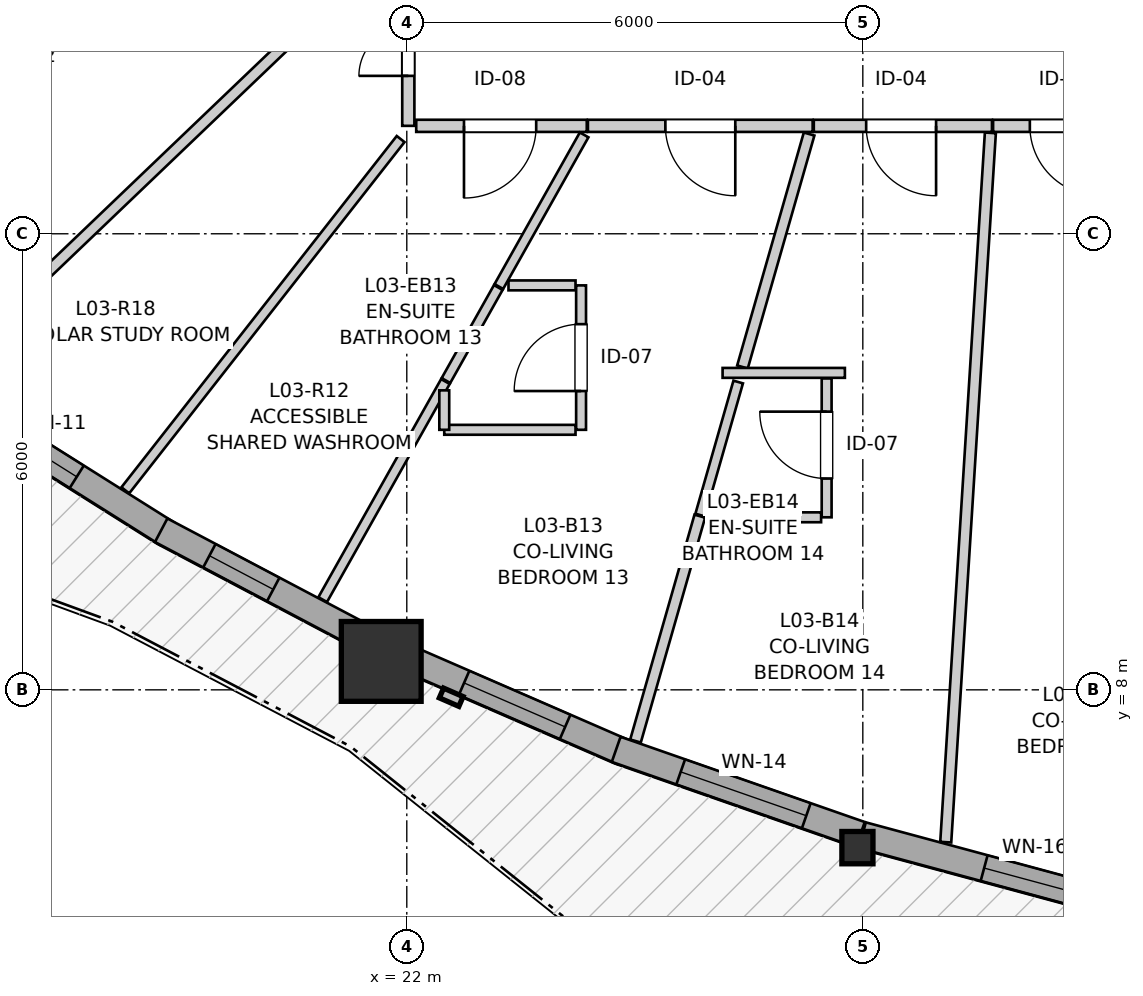
"""IFC4 building model, lengths in metres.
Left out: names, types, materials, properties, quantities, classifications, styles, units other than length and angle.
Written with IfcOpenShell. Run it as: python <this file> out.ifc"""

import sys

from ifc_helpers import new_model, si_unit, direction, frame, frame_2d, origin, origin_2d, place, context, subcontext, project, spatial, rectangle, i_section, extrude, source, transform, mapped, element, fill, save


model = new_model("IFC4")
c1 = context("Model", 3, precision=1e-05, world=origin(), true_north=direction((0.0, 1.0)))
c2 = subcontext(c1, "Body", "Model", "MODEL_VIEW")
j1 = project(units=[si_unit("LENGTHUNIT", "METRE"), si_unit("PLANEANGLEUNIT", "RADIAN")], contexts=[c1])
p1 = place(None, origin())
s1 = spatial("IfcSite", under=j1, at=p1, CompositionType="ELEMENT")
p2 = place(p1, origin())
s2 = spatial("IfcBuilding", under=s1, at=p2, CompositionType="ELEMENT")
p3 = place(p2, frame((0.0, 0.0, 14.2)))
s3 = spatial("IfcBuildingStorey", under=s2, at=p3, CompositionType="ELEMENT", Elevation=14.2)
m1 = source(origin(), c2, "Body", "SweptSolid", [
    extrude(rectangle(XDim=1.05, YDim=1.05, at=origin_2d()), origin(), (0.0, 0.0, 1.0), 2.94),
])
p4 = place(p3, frame((21.664, 8.374, 0.0), z_axis=(0.0, 0.0, 1.0), x_axis=(1.0, 0.0, 0.0)))
e1 = element("IfcColumn", 1, at=p4, inside=s3, PredefinedType="COLUMN", context=c2, shape_type="MappedRepresentation", body=[
    mapped(m1, transform((0.0, 0.0, 0.0), x_axis=(1.0, 0.0, 0.0), y_axis=(0.0, 1.0, 0.0), z_axis=(0.0, 0.0, 1.0), scale=1.0)),
])
m2 = source(origin(), c2, "Body", "SweptSolid", [
    extrude(i_section(OverallWidth=0.409, OverallDepth=0.425, WebThickness=0.03, FlangeThickness=0.048, FilletRadius=0.015, at=origin_2d()), origin(), (0.0, 0.0, 1.0), 2.94),
])
p5 = place(p3, frame((27.929, 5.924, 0.0), z_axis=(0.0, 0.0, 1.0), x_axis=(1.0, 0.0, 0.0)))
e2 = element("IfcColumn", 2, at=p5, inside=s3, PredefinedType="PILASTER", context=c2, shape_type="MappedRepresentation", body=[
    mapped(m2, transform((0.0, 0.0, 0.0), x_axis=(1.0, 0.0, 0.0), y_axis=(0.0, 1.0, 0.0), z_axis=(0.0, 0.0, 1.0), scale=1.0)),
])
p6 = place(p3, frame((16.014, 11.837, 0.0), z_axis=(0.0, 0.0, 1.0), x_axis=(0.846420438233, -0.532515203295, 0.0)))
e3 = element("IfcWall", 3, at=p6, inside=s3, PredefinedType="SOLIDWALL", context=c2, shape_type="SweptSolid", body=[
    extrude(rectangle(XDim=3.346, YDim=0.35, at=frame_2d((1.673, 0.0))), origin(), (0.0, 0.0, 1.0), 2.42),
])
p7 = place(p6, frame((0.692, 0.0, 0.82)))
e4 = element("IfcOpeningElement", 4, at=p7, cuts=e3, PredefinedType="OPENING", context=c2, shape_type="SweptSolid", body=[
    extrude(rectangle(XDim=1.25, YDim=1.35, at=frame_2d((0.625, 0.675))), frame((0.0, 0.185, 0.0), z_axis=(0.0, -1.0, 0.0), x_axis=(1.0, 0.0, 0.0)), (0.0, 0.0, 1.0), 0.37),
])
p8 = place(p3, frame((18.769, 10.1, 0.0), z_axis=(0.0, 0.0, 1.0), x_axis=(0.884401188265, -0.466727477438, 0.0)))
e5 = element("IfcWall", 5, at=p8, inside=s3, PredefinedType="SOLIDWALL", context=c2, shape_type="SweptSolid", body=[
    extrude(rectangle(XDim=3.066, YDim=0.35, at=frame_2d((1.533, 0.0))), origin(), (0.0, 0.0, 1.0), 2.42),
])
p9 = place(p8, frame((0.717, 0.0, 0.82)))
e6 = element("IfcOpeningElement", 6, at=p9, cuts=e5, PredefinedType="OPENING", context=c2, shape_type="SweptSolid", body=[
    extrude(rectangle(XDim=0.95, YDim=1.35, at=frame_2d((0.475, 0.675))), frame((0.0, 0.185, 0.0), z_axis=(0.0, -1.0, 0.0), x_axis=(1.0, 0.0, 0.0)), (0.0, 0.0, 1.0), 0.37),
])
p10 = place(p3, frame((22.009, 8.415, 0.0), z_axis=(0.0, 0.0, 1.0), x_axis=(0.917077605242, -0.398708748292, 0.0)))
e7 = element("IfcWall", 7, at=p10, inside=s3, PredefinedType="SOLIDWALL", context=c2, shape_type="SweptSolid", body=[
    extrude(rectangle(XDim=3.085, YDim=0.35, at=frame_2d((1.542, 0.0))), origin(), (0.0, 0.0, 1.0), 2.42),
])
p11 = place(p10, frame((0.812, 0.0, 0.82)))
e8 = element("IfcOpeningElement", 8, at=p11, cuts=e7, PredefinedType="OPENING", context=c2, shape_type="SweptSolid", body=[
    extrude(rectangle(XDim=1.45, YDim=1.25, at=frame_2d((0.725, 0.625))), frame((0.0, 0.185, 0.0), z_axis=(0.0, -1.0, 0.0), x_axis=(1.0, 0.0, 0.0)), (0.0, 0.0, 1.0), 0.37),
])
p12 = place(p3, frame((24.755, 7.217, 0.0), z_axis=(0.0, 0.0, 1.0), x_axis=(0.944148800827, -0.329519410501, 0.0)))
e9 = element("IfcWall", 9, at=p12, inside=s3, PredefinedType="SOLIDWALL", context=c2, shape_type="SweptSolid", body=[
    extrude(rectangle(XDim=3.403, YDim=0.35, at=frame_2d((1.701, 0.0))), origin(), (0.0, 0.0, 1.0), 2.42),
])
p13 = place(p12, frame((0.899, 0.0, 0.82)))
e10 = element("IfcOpeningElement", 10, at=p13, cuts=e9, PredefinedType="OPENING", context=c2, shape_type="SweptSolid", body=[
    extrude(rectangle(XDim=1.75, YDim=1.3, at=frame_2d((0.875, 0.65))), frame((0.0, 0.185, 0.0), z_axis=(0.0, -1.0, 0.0), x_axis=(1.0, 0.0, 0.0)), (0.0, 0.0, 1.0), 0.37),
])
p14 = place(p3, frame((27.994, 6.088, 0.0), z_axis=(0.0, 0.0, 1.0), x_axis=(0.965452701472, -0.260578359079, 0.0)))
e11 = element("IfcWall", 11, at=p14, inside=s3, PredefinedType="SOLIDWALL", context=c2, shape_type="SweptSolid", body=[
    extrude(rectangle(XDim=3.459, YDim=0.35, at=frame_2d((1.729, 0.0))), origin(), (0.0, 0.0, 1.0), 2.42),
])
p15 = place(p14, frame((1.66, 0.0, 0.82)))
e12 = element("IfcOpeningElement", 12, at=p15, cuts=e11, PredefinedType="OPENING", context=c2, shape_type="SweptSolid", body=[
    extrude(rectangle(XDim=1.15, YDim=1.2, at=frame_2d((0.575, 0.6))), frame((0.0, 0.185, 0.0), z_axis=(0.0, -1.0, 0.0), x_axis=(1.0, 0.0, 0.0)), (0.0, 0.0, 1.0), 0.37),
])
p16 = place(p3, frame((27.34, 15.42, 0.0), z_axis=(0.0, 0.0, 1.0), x_axis=(-1.0, 0.0, 0.0)))
e13 = element("IfcWall", 13, at=p16, inside=s3, PredefinedType="PARTITIONING", context=c2, shape_type="SweptSolid", body=[
    extrude(rectangle(XDim=2.957, YDim=0.16, at=frame_2d((1.479, 0.0))), origin(), (0.0, 0.0, 1.0), 2.94),
])
p17 = place(p16, frame((1.018, 0.0, 0.0)))
e14 = element("IfcOpeningElement", 14, at=p17, cuts=e13, PredefinedType="OPENING", context=c2, shape_type="SweptSolid", body=[
    extrude(rectangle(XDim=0.92, YDim=2.1, at=frame_2d((0.46, 1.05))), frame((0.0, 0.09, 0.0), z_axis=(0.0, -1.0, 0.0), x_axis=(1.0, 0.0, 0.0)), (0.0, 0.0, 1.0), 0.18),
])
p18 = place(p3, frame((22.02, 15.42, 0.0), z_axis=(0.0, 0.0, 1.0), x_axis=(0.0, 1.0, 0.0)))
e15 = element("IfcWall", 15, at=p18, inside=s3, PredefinedType="PARTITIONING", context=c2, shape_type="SweptSolid", body=[
    extrude(rectangle(XDim=2.579, YDim=0.16, at=frame_2d((1.29, 0.0))), origin(), (0.0, 0.0, 1.0), 2.94),
])
p19 = place(p18, frame((0.657, 0.0, 0.0)))
e16 = element("IfcOpeningElement", 16, at=p19, cuts=e15, PredefinedType="OPENING", context=c2, shape_type="SweptSolid", body=[
    extrude(rectangle(XDim=1.3, YDim=2.1, at=frame_2d((0.65, 1.05))), frame((0.0, 0.09, 0.0), z_axis=(0.0, -1.0, 0.0), x_axis=(1.0, 0.0, 0.0)), (0.0, 0.0, 1.0), 0.18),
])
p20 = place(p3, frame((29.699, 15.42, 0.0), z_axis=(0.0, 0.0, 1.0), x_axis=(-1.0, 0.0, 0.0)))
e17 = element("IfcWall", 17, at=p20, inside=s3, PredefinedType="PARTITIONING", context=c2, shape_type="SweptSolid", body=[
    extrude(rectangle(XDim=2.344, YDim=0.16, at=frame_2d((1.172, 0.0))), origin(), (0.0, 0.0, 1.0), 2.94),
])
p21 = place(p20, frame((0.735, 0.0, 0.0)))
e18 = element("IfcOpeningElement", 18, at=p21, cuts=e17, PredefinedType="OPENING", context=c2, shape_type="SweptSolid", body=[
    extrude(rectangle(XDim=0.92, YDim=2.1, at=frame_2d((0.46, 1.05))), frame((0.0, 0.09, 0.0), z_axis=(0.0, -1.0, 0.0), x_axis=(1.0, 0.0, 0.0)), (0.0, 0.0, 1.0), 0.18),
])
p22 = place(p3, frame((24.368, 15.42, 0.0), z_axis=(0.0, 0.0, 1.0), x_axis=(-1.0, 0.0, 0.0)))
e19 = element("IfcWall", 19, at=p22, inside=s3, PredefinedType="PARTITIONING", context=c2, shape_type="SweptSolid", body=[
    extrude(rectangle(XDim=2.244, YDim=0.16, at=frame_2d((1.122, 0.0))), origin(), (0.0, 0.0, 1.0), 2.94),
])
p23 = place(p22, frame((0.666, 0.0, 0.0)))
e20 = element("IfcOpeningElement", 20, at=p23, cuts=e19, PredefinedType="OPENING", context=c2, shape_type="SweptSolid", body=[
    extrude(rectangle(XDim=0.95, YDim=2.1, at=frame_2d((0.475, 1.05))), frame((0.0, 0.09, 0.0), z_axis=(0.0, -1.0, 0.0), x_axis=(1.0, 0.0, 0.0)), (0.0, 0.0, 1.0), 0.18),
])
p24 = place(p3, frame((31.646, 15.42, 0.0), z_axis=(0.0, 0.0, 1.0), x_axis=(-1.0, 0.0, 0.0)))
e21 = element("IfcWall", 21, at=p24, inside=s3, PredefinedType="PARTITIONING", context=c2, shape_type="SweptSolid", body=[
    extrude(rectangle(XDim=1.932, YDim=0.16, at=frame_2d((0.966, 0.0))), origin(), (0.0, 0.0, 1.0), 2.94),
])
p25 = place(p24, frame((0.529, 0.0, 0.0)))
e22 = element("IfcOpeningElement", 22, at=p25, cuts=e21, PredefinedType="OPENING", context=c2, shape_type="SweptSolid", body=[
    extrude(rectangle(XDim=0.92, YDim=2.1, at=frame_2d((0.46, 1.05))), frame((0.0, 0.09, 0.0), z_axis=(0.0, -1.0, 0.0), x_axis=(1.0, 0.0, 0.0)), (0.0, 0.0, 1.0), 0.18),
])
p26 = place(p3, frame((24.293, 11.421, 0.0), z_axis=(0.0, 0.0, 1.0), x_axis=(0.0, 1.0, 0.0)))
e23 = element("IfcWall", 23, at=p26, inside=s3, PredefinedType="PARTITIONING", context=c2, shape_type="SweptSolid", body=[
    extrude(rectangle(XDim=1.9, YDim=0.13, at=frame_2d((0.95, 0.0))), origin(), (0.0, 0.0, 1.0), 2.94),
])
p27 = place(p26, frame((0.51, 0.0, 0.0)))
e24 = element("IfcOpeningElement", 24, at=p27, cuts=e23, PredefinedType="OPENING", context=c2, shape_type="SweptSolid", body=[
    extrude(rectangle(XDim=0.88, YDim=2.05, at=frame_2d((0.44, 1.025))), frame((0.0, 0.075, 0.0), z_axis=(0.0, -1.0, 0.0), x_axis=(1.0, 0.0, 0.0)), (0.0, 0.0, 1.0), 0.15),
])
p28 = place(p3, frame((27.524, 10.27, 0.0), z_axis=(0.0, 0.0, 1.0), x_axis=(0.0, 1.0, 0.0)))
e25 = element("IfcWall", 25, at=p28, inside=s3, PredefinedType="PARTITIONING", context=c2, shape_type="SweptSolid", body=[
    extrude(rectangle(XDim=1.827, YDim=0.13, at=frame_2d((0.914, 0.0))), origin(), (0.0, 0.0, 1.0), 2.94),
])
p29 = place(p28, frame((0.51, 0.0, 0.0)))
e26 = element("IfcOpeningElement", 26, at=p29, cuts=e25, PredefinedType="OPENING", context=c2, shape_type="SweptSolid", body=[
    extrude(rectangle(XDim=0.88, YDim=2.05, at=frame_2d((0.44, 1.025))), frame((0.0, 0.075, 0.0), z_axis=(0.0, -1.0, 0.0), x_axis=(1.0, 0.0, 0.0)), (0.0, 0.0, 1.0), 0.15),
])
p30 = place(p3, frame((29.091, 5.996, 0.0), z_axis=(0.0, 0.0, 1.0), x_axis=(0.062797687125, 0.998026277456, 0.0)))
e27 = element("IfcWall", 27, at=p30, inside=s3, PredefinedType="PARTITIONING", context=c2, shape_type="SweptSolid", body=[
    extrude(rectangle(XDim=9.35, YDim=0.145, at=frame_2d((4.675, 0.0))), origin(), (0.0, 0.0, 1.0), 2.94),
])
p31 = place(p3, frame((15.888, 12.171, 0.0), z_axis=(0.0, 0.0, 1.0), x_axis=(0.722733244608, 0.691127091886, 0.0)))
e28 = element("IfcWall", 28, at=p31, inside=s3, PredefinedType="PARTITIONING", context=c2, shape_type="SweptSolid", body=[
    extrude(rectangle(XDim=8.296, YDim=0.145, at=frame_2d((4.148, 0.0))), origin(), (0.0, 0.0, 1.0), 2.94),
])
p32 = place(p3, frame((18.296, 10.625, 0.0), z_axis=(0.0, 0.0, 1.0), x_axis=(0.616906721473, 0.787036274261, 0.0)))
e29 = element("IfcWall", 29, at=p32, inside=s3, PredefinedType="PARTITIONING", context=c2, shape_type="SweptSolid", body=[
    extrude(rectangle(XDim=5.872, YDim=0.13, at=frame_2d((2.936, 0.0))), origin(), (0.0, 0.0, 1.0), 2.94),
])
p33 = place(p3, frame((26.417, 12.248, 0.0), z_axis=(0.0, 0.0, 1.0), x_axis=(0.275014447674, 0.961440093594, 0.0)))
e30 = element("IfcWall", 30, at=p33, inside=s3, PredefinedType="PARTITIONING", context=c2, shape_type="SweptSolid", body=[
    extrude(rectangle(XDim=3.188, YDim=0.145, at=frame_2d((1.594, 0.0))), origin(), (0.0, 0.0, 1.0), 2.94),
])
p34 = place(p3, frame((20.894, 9.187, 0.0), z_axis=(0.0, 0.0, 1.0), x_axis=(0.490433761368, 0.871478471169, 0.0)))
e31 = element("IfcWall", 31, at=p34, inside=s3, PredefinedType="PARTITIONING", context=c2, shape_type="SweptSolid", body=[
    extrude(rectangle(XDim=3.292, YDim=0.13, at=frame_2d((1.646, 0.0))), origin(), (0.0, 0.0, 1.0), 2.94),
])
p35 = place(p3, frame((25.009, 7.327, 0.0), z_axis=(0.0, 0.0, 1.0), x_axis=(0.274867847045, 0.961482015776, 0.0)))
e32 = element("IfcWall", 32, at=p35, inside=s3, PredefinedType="PARTITIONING", context=c2, shape_type="SweptSolid", body=[
    extrude(rectangle(XDim=3.077, YDim=0.145, at=frame_2d((1.538, 0.0))), origin(), (0.0, 0.0, 1.0), 2.94),
])
p36 = place(p3, frame((23.211, 13.306, 0.0), z_axis=(0.0, 0.0, 1.0), x_axis=(0.490235923681, 0.871589776864, 0.0)))
e33 = element("IfcWall", 33, at=p36, inside=s3, PredefinedType="PARTITIONING", context=c2, shape_type="SweptSolid", body=[
    extrude(rectangle(XDim=2.289, YDim=0.13, at=frame_2d((1.145, 0.0))), origin(), (0.0, 0.0, 1.0), 2.94),
])
p37 = place(p3, frame((25.86, 10.299, 0.0), z_axis=(0.0, 0.0, 1.0), x_axis=(0.275022188369, 0.961437879379, 0.0)))
e34 = element("IfcWall", 34, at=p37, inside=s3, PredefinedType="PARTITIONING", context=c2, shape_type="SweptSolid", body=[
    extrude(rectangle(XDim=1.821, YDim=0.13, at=frame_2d((0.91, 0.0))), origin(), (0.0, 0.0, 1.0), 2.94),
])
p38 = place(p3, frame((22.493, 11.421, 0.0), z_axis=(0.0, 0.0, 1.0), x_axis=(1.0, 0.0, 0.0)))
e35 = element("IfcWall", 35, at=p38, inside=s3, PredefinedType="PARTITIONING", context=c2, shape_type="SweptSolid", body=[
    extrude(rectangle(XDim=1.727, YDim=0.13, at=frame_2d((0.864, 0.0))), origin(), (0.0, 0.0, 1.0), 2.508),
])
p39 = place(p3, frame((25.953, 10.27, 0.0), z_axis=(0.0, 0.0, 1.0), x_axis=(1.0, 0.0, 0.0)))
e36 = element("IfcWall", 36, at=p39, inside=s3, PredefinedType="PARTITIONING", context=c2, shape_type="SweptSolid", body=[
    extrude(rectangle(XDim=1.498, YDim=0.13, at=frame_2d((0.749, 0.0))), origin(), (0.0, 0.0, 1.0), 2.508),
])
p40 = place(p3, frame((22.515, 12.069, 0.0), z_axis=(0.0, 0.0, 1.0), x_axis=(0.490286002917, 0.871561607314, 0.0)))
e37 = element("IfcWall", 37, at=p40, inside=s3, PredefinedType="PARTITIONING", context=c2, shape_type="SweptSolid", body=[
    extrude(rectangle(XDim=1.404, YDim=0.13, at=frame_2d((0.702, 0.0))), origin(), (0.0, 0.0, 1.0), 2.94),
])
p41 = place(p3, frame((26.155, 12.17, 0.0), z_axis=(0.0, 0.0, 1.0), x_axis=(1.0, 0.0, 0.0)))
e38 = element("IfcWall", 38, at=p41, inside=s3, PredefinedType="PARTITIONING", context=c2, shape_type="SweptSolid", body=[
    extrude(rectangle(XDim=1.609, YDim=0.13, at=frame_2d((0.804, 0.0))), origin(), (0.0, 0.0, 1.0), 2.94),
])
p42 = place(p3, frame((23.338, 13.321, 0.0), z_axis=(0.0, 0.0, 1.0), x_axis=(1.0, 0.0, 0.0)))
e39 = element("IfcWall", 39, at=p42, inside=s3, PredefinedType="PARTITIONING", context=c2, shape_type="SweptSolid", body=[
    extrude(rectangle(XDim=0.882, YDim=0.13, at=frame_2d((0.441, 0.0))), origin(), (0.0, 0.0, 1.0), 2.94),
])
p43 = place(p3, frame((22.493, 11.421, 0.0), z_axis=(0.0, 0.0, 1.0), x_axis=(0.0, 1.0, 0.0)))
e40 = element("IfcWall", 40, at=p43, inside=s3, PredefinedType="PARTITIONING", context=c2, shape_type="SweptSolid", body=[
    extrude(rectangle(XDim=0.519, YDim=0.13, at=frame_2d((0.26, 0.0))), origin(), (0.0, 0.0, 1.0), 2.94),
])
m3 = source(origin(), c2, "Body", "SweptSolid", [
    extrude(rectangle(XDim=1.25, YDim=1.35, at=frame_2d((0.625, 0.675))), frame((0.0, 0.03, 0.0), z_axis=(0.0, -1.0, 0.0), x_axis=(1.0, 0.0, 0.0)), (0.0, 0.0, 1.0), 0.06),
])
p44 = place(p7, origin())
e41 = element("IfcWindow", 41, at=p44, inside=s3, PartitioningType="SINGLE_PANEL", PredefinedType="WINDOW", context=c2, shape_type="MappedRepresentation", body=[
    mapped(m3, transform((0.0, 0.0, 0.0), x_axis=(1.0, 0.0, 0.0), y_axis=(0.0, 1.0, 0.0), z_axis=(0.0, 0.0, 1.0), scale=1.0)),
])
fill(e4, e41)
m4 = source(origin(), c2, "Body", "SweptSolid", [
    extrude(rectangle(XDim=0.95, YDim=1.35, at=frame_2d((0.475, 0.675))), frame((0.0, 0.03, 0.0), z_axis=(0.0, -1.0, 0.0), x_axis=(1.0, 0.0, 0.0)), (0.0, 0.0, 1.0), 0.06),
])
p45 = place(p9, origin())
e42 = element("IfcWindow", 42, at=p45, inside=s3, PartitioningType="SINGLE_PANEL", PredefinedType="WINDOW", context=c2, shape_type="MappedRepresentation", body=[
    mapped(m4, transform((0.0, 0.0, 0.0), x_axis=(1.0, 0.0, 0.0), y_axis=(0.0, 1.0, 0.0), z_axis=(0.0, 0.0, 1.0), scale=1.0)),
])
fill(e6, e42)
m5 = source(origin(), c2, "Body", "SweptSolid", [
    extrude(rectangle(XDim=1.45, YDim=1.25, at=frame_2d((0.725, 0.625))), frame((0.0, 0.03, 0.0), z_axis=(0.0, -1.0, 0.0), x_axis=(1.0, 0.0, 0.0)), (0.0, 0.0, 1.0), 0.06),
])
p46 = place(p11, origin())
e43 = element("IfcWindow", 43, at=p46, inside=s3, PartitioningType="SINGLE_PANEL", PredefinedType="WINDOW", context=c2, shape_type="MappedRepresentation", body=[
    mapped(m5, transform((0.0, 0.0, 0.0), x_axis=(1.0, 0.0, 0.0), y_axis=(0.0, 1.0, 0.0), z_axis=(0.0, 0.0, 1.0), scale=1.0)),
])
fill(e8, e43)
m6 = source(origin(), c2, "Body", "SweptSolid", [
    extrude(rectangle(XDim=1.75, YDim=1.3, at=frame_2d((0.875, 0.65))), frame((0.0, 0.03, 0.0), z_axis=(0.0, -1.0, 0.0), x_axis=(1.0, 0.0, 0.0)), (0.0, 0.0, 1.0), 0.06),
])
p47 = place(p13, origin())
e44 = element("IfcWindow", 44, at=p47, inside=s3, PartitioningType="SINGLE_PANEL", PredefinedType="WINDOW", context=c2, shape_type="MappedRepresentation", body=[
    mapped(m6, transform((0.0, 0.0, 0.0), x_axis=(1.0, 0.0, 0.0), y_axis=(0.0, 1.0, 0.0), z_axis=(0.0, 0.0, 1.0), scale=1.0)),
])
fill(e10, e44)
m7 = source(origin(), c2, "Body", "SweptSolid", [
    extrude(rectangle(XDim=1.15, YDim=1.2, at=frame_2d((0.575, 0.6))), frame((0.0, 0.03, 0.0), z_axis=(0.0, -1.0, 0.0), x_axis=(1.0, 0.0, 0.0)), (0.0, 0.0, 1.0), 0.06),
])
p48 = place(p15, origin())
e45 = element("IfcWindow", 45, at=p48, inside=s3, PartitioningType="SINGLE_PANEL", PredefinedType="WINDOW", context=c2, shape_type="MappedRepresentation", body=[
    mapped(m7, transform((0.0, 0.0, 0.0), x_axis=(1.0, 0.0, 0.0), y_axis=(0.0, 1.0, 0.0), z_axis=(0.0, 0.0, 1.0), scale=1.0)),
])
fill(e12, e45)
m8 = source(origin(), c2, "Body", "SweptSolid", [
    extrude(rectangle(XDim=0.92, YDim=2.1, at=frame_2d((0.46, 1.05))), frame((0.0, 0.025, 0.0), z_axis=(0.0, -1.0, 0.0), x_axis=(1.0, 0.0, 0.0)), (0.0, 0.0, 1.0), 0.05),
])
p49 = place(p17, origin())
e46 = element("IfcDoor", 46, at=p49, inside=s3, OperationType="SINGLE_SWING_LEFT", PredefinedType="DOOR", context=c2, shape_type="MappedRepresentation", body=[
    mapped(m8, transform((0.0, 0.0, 0.0), x_axis=(1.0, 0.0, 0.0), y_axis=(0.0, 1.0, 0.0), z_axis=(0.0, 0.0, 1.0), scale=1.0)),
])
fill(e14, e46)
m9 = source(origin(), c2, "Body", "SweptSolid", [
    extrude(rectangle(XDim=1.3, YDim=2.1, at=frame_2d((0.65, 1.05))), frame((0.0, 0.025, 0.0), z_axis=(0.0, -1.0, 0.0), x_axis=(1.0, 0.0, 0.0)), (0.0, 0.0, 1.0), 0.05),
])
p50 = place(p19, origin())
e47 = element("IfcDoor", 47, at=p50, inside=s3, OperationType="DOUBLE_DOOR_SINGLE_SWING", PredefinedType="DOOR", context=c2, shape_type="MappedRepresentation", body=[
    mapped(m9, transform((0.0, 0.0, 0.0), x_axis=(1.0, 0.0, 0.0), y_axis=(0.0, 1.0, 0.0), z_axis=(0.0, 0.0, 1.0), scale=1.0)),
])
fill(e16, e47)
p51 = place(p21, origin())
e48 = element("IfcDoor", 48, at=p51, inside=s3, OperationType="SINGLE_SWING_LEFT", PredefinedType="DOOR", context=c2, shape_type="MappedRepresentation", body=[
    mapped(m8, transform((0.0, 0.0, 0.0), x_axis=(1.0, 0.0, 0.0), y_axis=(0.0, 1.0, 0.0), z_axis=(0.0, 0.0, 1.0), scale=1.0)),
])
fill(e18, e48)
m10 = source(origin(), c2, "Body", "SweptSolid", [
    extrude(rectangle(XDim=0.95, YDim=2.1, at=frame_2d((0.475, 1.05))), frame((0.0, 0.025, 0.0), z_axis=(0.0, -1.0, 0.0), x_axis=(1.0, 0.0, 0.0)), (0.0, 0.0, 1.0), 0.05),
])
p52 = place(p23, origin())
e49 = element("IfcDoor", 49, at=p52, inside=s3, OperationType="SINGLE_SWING_RIGHT", PredefinedType="DOOR", context=c2, shape_type="MappedRepresentation", body=[
    mapped(m10, transform((0.0, 0.0, 0.0), x_axis=(1.0, 0.0, 0.0), y_axis=(0.0, 1.0, 0.0), z_axis=(0.0, 0.0, 1.0), scale=1.0)),
])
fill(e20, e49)
p53 = place(p25, origin())
e50 = element("IfcDoor", 50, at=p53, inside=s3, OperationType="SINGLE_SWING_LEFT", PredefinedType="DOOR", context=c2, shape_type="MappedRepresentation", body=[
    mapped(m8, transform((0.0, 0.0, 0.0), x_axis=(1.0, 0.0, 0.0), y_axis=(0.0, 1.0, 0.0), z_axis=(0.0, 0.0, 1.0), scale=1.0)),
])
fill(e22, e50)
m11 = source(origin(), c2, "Body", "SweptSolid", [
    extrude(rectangle(XDim=0.88, YDim=2.05, at=frame_2d((0.44, 1.025))), frame((0.0, 0.025, 0.0), z_axis=(0.0, -1.0, 0.0), x_axis=(1.0, 0.0, 0.0)), (0.0, 0.0, 1.0), 0.05),
])
p54 = place(p27, origin())
e51 = element("IfcDoor", 51, at=p54, inside=s3, OperationType="SINGLE_SWING_LEFT", PredefinedType="DOOR", context=c2, shape_type="MappedRepresentation", body=[
    mapped(m11, transform((0.0, 0.0, 0.0), x_axis=(1.0, 0.0, 0.0), y_axis=(0.0, 1.0, 0.0), z_axis=(0.0, 0.0, 1.0), scale=1.0)),
])
fill(e24, e51)
p55 = place(p29, origin())
e52 = element("IfcDoor", 52, at=p55, inside=s3, OperationType="SINGLE_SWING_RIGHT", PredefinedType="DOOR", context=c2, shape_type="MappedRepresentation", body=[
    mapped(m11, transform((0.0, 0.0, 0.0), x_axis=(1.0, 0.0, 0.0), y_axis=(0.0, 1.0, 0.0), z_axis=(0.0, 0.0, 1.0), scale=1.0)),
])
fill(e26, e52)
save(model, sys.argv[1])
